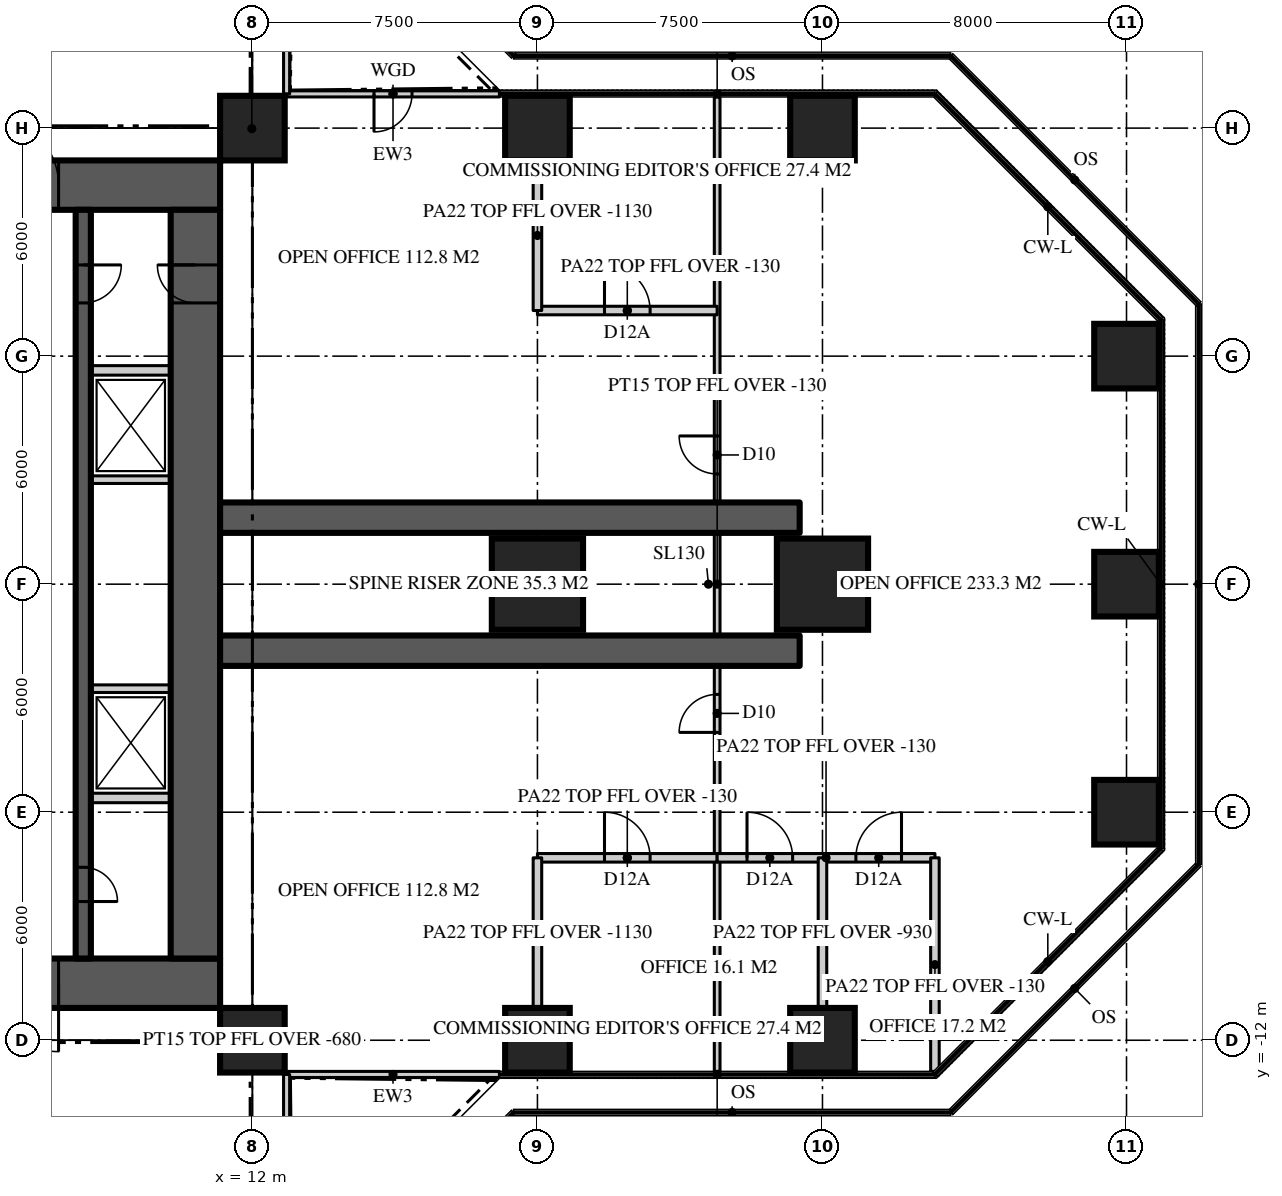
"""IFC4 building model, lengths in metres.
Left out: names, types, materials, properties, quantities, classifications, styles, units other than length and angle.
Written with IfcOpenShell. Run it as: python <this file> out.ifc"""

import sys

from ifc_helpers import new_model, si_unit, direction, frame, frame_2d, origin, origin_2d, place, context, subcontext, project, spatial, rectangle, extrude, element, fill, save


model = new_model("IFC4")
c1 = context("Model", 3, precision=1e-05, world=origin(), true_north=direction((0.0, 1.0)))
c2 = subcontext(c1, "Body", "Model", "MODEL_VIEW")
j1 = project(units=[si_unit("LENGTHUNIT", "METRE"), si_unit("PLANEANGLEUNIT", "RADIAN")], contexts=[c1])
p1 = place(None, origin())
s1 = spatial("IfcSite", under=j1, at=p1, CompositionType="ELEMENT")
p2 = place(p1, origin())
s2 = spatial("IfcBuilding", under=s1, at=p2, CompositionType="ELEMENT")
p3 = place(p2, frame((0.0, 0.0, 86.4)))
s3 = spatial("IfcBuildingStorey", under=s2, at=p3, CompositionType="ELEMENT", Elevation=86.4)
p4 = place(p3, frame((-11.15, 10.5, 0.0), z_axis=(0.0, 0.0, 1.0), x_axis=(1.0, 0.0, 0.0)))
e1 = element("IfcWall", 1, at=p4, inside=s3, PredefinedType="SHEAR", context=c2, shape_type="SweptSolid", body=[
    extrude(rectangle(XDim=22.3, YDim=1.3, at=frame_2d((11.15, 0.0))), origin(), (0.0, 0.0, 1.0), 3.9),
])
p5 = place(p4, frame((4.25, 0.0, 0.0)))
e2 = element("IfcOpeningElement", 2, at=p5, cuts=e1, PredefinedType="OPENING", context=c2, shape_type="SweptSolid", body=[
    extrude(rectangle(XDim=1.8, YDim=2.2, at=frame_2d((0.9, 1.1))), frame((0.0, 0.66, 0.0), z_axis=(0.0, -1.0, 0.0), x_axis=(1.0, 0.0, 0.0)), (0.0, 0.0, 1.0), 1.32),
])
p6 = place(p4, frame((16.25, 0.0, 0.0)))
e3 = element("IfcOpeningElement", 3, at=p6, cuts=e1, PredefinedType="OPENING", context=c2, shape_type="SweptSolid", body=[
    extrude(rectangle(XDim=1.8, YDim=2.2, at=frame_2d((0.9, 1.1))), frame((0.0, 0.66, 0.0), z_axis=(0.0, -1.0, 0.0), x_axis=(1.0, 0.0, 0.0)), (0.0, 0.0, 1.0), 1.32),
])
p7 = place(p3, frame((11.15, -10.5, 0.0), z_axis=(0.0, 0.0, 1.0), x_axis=(-1.0, 0.0, 0.0)))
e4 = element("IfcWall", 4, at=p7, inside=s3, PredefinedType="SHEAR", context=c2, shape_type="SweptSolid", body=[
    extrude(rectangle(XDim=22.3, YDim=1.3, at=frame_2d((11.15, 0.0))), origin(), (0.0, 0.0, 1.0), 3.9),
])
p8 = place(p7, frame((16.25, 0.0, 0.0)))
e5 = element("IfcOpeningElement", 5, at=p8, cuts=e4, PredefinedType="OPENING", context=c2, shape_type="SweptSolid", body=[
    extrude(rectangle(XDim=1.8, YDim=2.2, at=frame_2d((0.9, 1.1))), frame((0.0, 0.66, 0.0), z_axis=(0.0, -1.0, 0.0), x_axis=(1.0, 0.0, 0.0)), (0.0, 0.0, 1.0), 1.32),
])
p9 = place(p7, frame((4.25, 0.0, 0.0)))
e6 = element("IfcOpeningElement", 6, at=p9, cuts=e4, PredefinedType="OPENING", context=c2, shape_type="SweptSolid", body=[
    extrude(rectangle(XDim=1.8, YDim=2.2, at=frame_2d((0.9, 1.1))), frame((0.0, 0.66, 0.0), z_axis=(0.0, -1.0, 0.0), x_axis=(1.0, 0.0, 0.0)), (0.0, 0.0, 1.0), 1.32),
])
p10 = place(p3, frame((10.5, -9.85, 0.0), z_axis=(0.0, 0.0, 1.0), x_axis=(0.0, 1.0, 0.0)))
e7 = element("IfcWall", 7, at=p10, inside=s3, PredefinedType="SHEAR", context=c2, shape_type="SweptSolid", body=[
    extrude(rectangle(XDim=19.7, YDim=1.3, at=frame_2d((9.85, 0.0))), origin(), (0.0, 0.0, 1.0), 3.9),
])
p11 = place(p10, frame((17.25, 0.0, 0.0)))
e8 = element("IfcOpeningElement", 8, at=p11, cuts=e7, PredefinedType="OPENING", context=c2, shape_type="SweptSolid", body=[
    extrude(rectangle(XDim=1.0, YDim=2.2, at=frame_2d((0.5, 1.1))), frame((0.0, 0.66, 0.0), z_axis=(0.0, -1.0, 0.0), x_axis=(1.0, 0.0, 0.0)), (0.0, 0.0, 1.0), 1.32),
])
for number, where, z_axis, x_axis in (
    (9, (11.15, -1.75, 0.0), (0.0, 0.0, 1.0), (1.0, 0.0, 0.0)),
    (10, (11.15, 1.75, 0.0), (0.0, 0.0, 1.0), (1.0, 0.0, 0.0)),
):
    element("IfcWall", number, at=place(p3, frame(where, z_axis=z_axis, x_axis=x_axis)), inside=s3, PredefinedType="SHEAR", context=c2, shape_type="SweptSolid", body=[
        extrude(rectangle(XDim=15.25, YDim=0.8, at=frame_2d((7.625, 0.0))), origin(), (0.0, 0.0, 1.0), 3.9),
    ])
for number, where, z_axis, x_axis in (
    (11, (12.0, -12.0, 0.0), (0.0, 0.0, 1.0), (1.0, 0.0, 0.0)),
    (12, (19.5, -12.0, 0.0), (0.0, 0.0, 1.0), (1.0, 0.0, 0.0)),
    (13, (27.0, -12.0, 0.0), (0.0, 0.0, 1.0), (1.0, 0.0, 0.0)),
    (14, (35.0, -6.0, 0.0), (0.0, 0.0, 1.0), (1.0, 0.0, 0.0)),
):
    element("IfcColumn", number, at=place(p3, frame(where, z_axis=z_axis, x_axis=x_axis)), inside=s3, PredefinedType="COLUMN", context=c2, shape_type="SweptSolid", body=[
        extrude(rectangle(XDim=1.7, YDim=1.7, at=origin_2d()), origin(), (0.0, 0.0, 1.0), 3.9),
    ])
for number, where, z_axis, x_axis in (
    (15, (19.5, 0.0, 0.0), (0.0, 0.0, 1.0), (1.0, 0.0, 0.0)),
    (16, (27.0, 0.0, 0.0), (0.0, 0.0, 1.0), (1.0, 0.0, 0.0)),
):
    element("IfcColumn", number, at=place(p3, frame(where, z_axis=z_axis, x_axis=x_axis)), inside=s3, PredefinedType="COLUMN", context=c2, shape_type="SweptSolid", body=[
        extrude(rectangle(XDim=2.4, YDim=2.4, at=origin_2d()), origin(), (0.0, 0.0, 1.0), 3.9),
    ])
for number, where, z_axis, x_axis in (
    (17, (35.0, 0.0, 0.0), (0.0, 0.0, 1.0), (1.0, 0.0, 0.0)),
    (18, (35.0, 6.0, 0.0), (0.0, 0.0, 1.0), (1.0, 0.0, 0.0)),
    (19, (12.0, 12.0, 0.0), (0.0, 0.0, 1.0), (1.0, 0.0, 0.0)),
    (20, (19.5, 12.0, 0.0), (0.0, 0.0, 1.0), (1.0, 0.0, 0.0)),
    (21, (27.0, 12.0, 0.0), (0.0, 0.0, 1.0), (1.0, 0.0, 0.0)),
):
    element("IfcColumn", number, at=place(p3, frame(where, z_axis=z_axis, x_axis=x_axis)), inside=s3, PredefinedType="COLUMN", context=c2, shape_type="SweptSolid", body=[
        extrude(rectangle(XDim=1.7, YDim=1.7, at=origin_2d()), origin(), (0.0, 0.0, 1.0), 3.9),
    ])
p12 = place(p3, frame((12.9, -12.9, 0.0), z_axis=(0.0, 0.0, 1.0), x_axis=(1.0, 0.0, 0.0)))
e22 = element("IfcWall", 22, at=p12, inside=s3, PredefinedType="SOLIDWALL", context=c2, shape_type="SweptSolid", body=[
    extrude(rectangle(XDim=5.6, YDim=0.16, at=frame_2d((2.8, 0.0))), origin(), (0.0, 0.0, 1.0), 3.77),
])
p13 = place(p3, frame((18.5, 12.9, 0.0), z_axis=(0.0, 0.0, 1.0), x_axis=(-1.0, 0.0, 0.0)))
e23 = element("IfcWall", 23, at=p13, inside=s3, PredefinedType="SOLIDWALL", context=c2, shape_type="SweptSolid", body=[
    extrude(rectangle(XDim=5.6, YDim=0.16, at=frame_2d((2.8, 0.0))), origin(), (0.0, 0.0, 1.0), 3.77),
])
p14 = place(p13, frame((2.3, 0.0, 0.0)))
e24 = element("IfcOpeningElement", 24, at=p14, cuts=e23, PredefinedType="OPENING", context=c2, shape_type="SweptSolid", body=[
    extrude(rectangle(XDim=1.0, YDim=2.2, at=frame_2d((0.5, 1.1))), frame((0.0, 0.09, 0.0), z_axis=(0.0, -1.0, 0.0), x_axis=(1.0, 0.0, 0.0)), (0.0, 0.0, 1.0), 0.18),
])
p15 = place(p3, frame((12.9, 12.9, 0.0), z_axis=(0.0, 0.0, 1.0), x_axis=(0.0, 1.0, 0.0)))
e25 = element("IfcWall", 25, at=p15, inside=s3, PredefinedType="SOLIDWALL", context=c2, shape_type="SweptSolid", body=[
    extrude(rectangle(XDim=5.6, YDim=0.16, at=frame_2d((2.8, 0.0))), origin(), (0.0, 0.0, 1.0), 3.77),
])
p16 = place(p3, frame((12.9, -18.5, 0.0), z_axis=(0.0, 0.0, 1.0), x_axis=(0.0, 1.0, 0.0)))
e26 = element("IfcWall", 26, at=p16, inside=s3, PredefinedType="SOLIDWALL", context=c2, shape_type="SweptSolid", body=[
    extrude(rectangle(XDim=5.6, YDim=0.16, at=frame_2d((2.8, 0.0))), origin(), (0.0, 0.0, 1.0), 3.77),
])
p17 = place(p16, frame((2.3, 0.0, 0.0)))
e27 = element("IfcOpeningElement", 27, at=p17, cuts=e26, PredefinedType="OPENING", context=c2, shape_type="SweptSolid", body=[
    extrude(rectangle(XDim=1.0, YDim=2.2, at=frame_2d((0.5, 1.1))), frame((0.0, 0.09, 0.0), z_axis=(0.0, -1.0, 0.0), x_axis=(1.0, 0.0, 0.0)), (0.0, 0.0, 1.0), 0.18),
])
p18 = place(p3, frame((7.55, 9.85, 0.0), z_axis=(0.0, 0.0, 1.0), x_axis=(0.0, -1.0, 0.0)))
e28 = element("IfcWall", 28, at=p18, inside=s3, PredefinedType="SHEAR", context=c2, shape_type="SweptSolid", body=[
    extrude(rectangle(XDim=19.7, YDim=0.4, at=frame_2d((9.85, 0.0))), origin(), (0.0, 0.0, 1.0), 3.9),
])
p19 = place(p18, frame((1.45, 0.0, 0.0)))
e29 = element("IfcOpeningElement", 29, at=p19, cuts=e28, PredefinedType="OPENING", context=c2, shape_type="SweptSolid", body=[
    extrude(rectangle(XDim=1.0, YDim=2.2, at=frame_2d((0.5, 1.1))), frame((0.0, 0.21, 0.0), z_axis=(0.0, -1.0, 0.0), x_axis=(1.0, 0.0, 0.0)), (0.0, 0.0, 1.0), 0.42),
])
p20 = place(p18, frame((17.3, 0.0, 0.0)))
e30 = element("IfcOpeningElement", 30, at=p20, cuts=e28, PredefinedType="OPENING", context=c2, shape_type="SweptSolid", body=[
    extrude(rectangle(XDim=0.9, YDim=2.1, at=frame_2d((0.45, 1.05))), frame((0.0, 0.21, 0.0), z_axis=(0.0, -1.0, 0.0), x_axis=(1.0, 0.0, 0.0)), (0.0, 0.0, 1.0), 0.42),
])
for number, where, z_axis, x_axis in (
    (31, (7.75, 5.625, 0.0), (0.0, 0.0, 1.0), (1.0, 0.0, 0.0)),
    (32, (7.75, -5.625, 0.0), (0.0, 0.0, 1.0), (1.0, 0.0, 0.0)),
):
    element("IfcWall", number, at=place(p3, frame(where, z_axis=z_axis, x_axis=x_axis)), inside=s3, PredefinedType="SOLIDWALL", context=c2, shape_type="SweptSolid", body=[
        extrude(rectangle(XDim=2.1, YDim=0.25, at=frame_2d((1.05, 0.0))), origin(), (0.0, 0.0, 1.0), 3.7),
    ])
for number, where, z_axis, x_axis in (
    (33, (7.75, -2.75, 0.0), (0.0, 0.0, 1.0), (1.0, 0.0, 0.0)),
    (34, (7.75, 2.75, 0.0), (0.0, 0.0, 1.0), (1.0, 0.0, 0.0)),
):
    element("IfcWall", number, at=place(p3, frame(where, z_axis=z_axis, x_axis=x_axis)), inside=s3, PredefinedType="SOLIDWALL", context=c2, shape_type="SweptSolid", body=[
        extrude(rectangle(XDim=2.1, YDim=0.2, at=frame_2d((1.05, 0.0))), origin(), (0.0, 0.0, 1.0), 3.7),
    ])
p21 = place(p3, frame((24.229, -12.82, 0.0), z_axis=(0.0, 0.0, 1.0), x_axis=(0.0, 1.0, 0.0)))
e35 = element("IfcWall", 35, at=p21, inside=s3, PredefinedType="PARTITIONING", context=c2, shape_type="SweptSolid", body=[
    extrude(rectangle(XDim=25.64, YDim=0.15, at=frame_2d((12.82, 0.0))), origin(), (0.0, 0.0, 1.0), 3.77),
])
p22 = place(p21, frame((15.72, 0.0, 0.0)))
e36 = element("IfcOpeningElement", 36, at=p22, cuts=e35, PredefinedType="OPENING", context=c2, shape_type="SweptSolid", body=[
    extrude(rectangle(XDim=1.0, YDim=2.2, at=frame_2d((0.5, 1.1))), frame((0.0, 0.085, 0.0), z_axis=(0.0, -1.0, 0.0), x_axis=(1.0, 0.0, 0.0)), (0.0, 0.0, 1.0), 0.17),
])
p23 = place(p21, frame((8.92, 0.0, 0.0)))
e37 = element("IfcOpeningElement", 37, at=p23, cuts=e35, PredefinedType="OPENING", context=c2, shape_type="SweptSolid", body=[
    extrude(rectangle(XDim=1.0, YDim=2.2, at=frame_2d((0.5, 1.1))), frame((0.0, 0.085, 0.0), z_axis=(0.0, -1.0, 0.0), x_axis=(1.0, 0.0, 0.0)), (0.0, 0.0, 1.0), 0.17),
])
p24 = place(p3, frame((19.5, 7.2, 0.0), z_axis=(0.0, 0.0, 1.0), x_axis=(1.0, 0.0, 0.0)))
e38 = element("IfcWall", 38, at=p24, inside=s3, PredefinedType="PARTITIONING", context=c2, shape_type="SweptSolid", body=[
    extrude(rectangle(XDim=4.729, YDim=0.225, at=frame_2d((2.365, 0.0))), origin(), (0.0, 0.0, 1.0), 3.77),
])
p25 = place(p24, frame((1.764, 0.0, 0.0)))
e39 = element("IfcOpeningElement", 39, at=p25, cuts=e38, PredefinedType="OPENING", context=c2, shape_type="SweptSolid", body=[
    extrude(rectangle(XDim=1.2, YDim=2.2, at=frame_2d((0.6, 1.1))), frame((0.0, 0.123, 0.0), z_axis=(0.0, -1.0, 0.0), x_axis=(1.0, 0.0, 0.0)), (0.0, 0.0, 1.0), 0.245),
])
p26 = place(p3, frame((19.5, 7.2, 0.0), z_axis=(0.0, 0.0, 1.0), x_axis=(0.0, 1.0, 0.0)))
e40 = element("IfcWall", 40, at=p26, inside=s3, PredefinedType="PARTITIONING", context=c2, shape_type="SweptSolid", body=[
    extrude(rectangle(XDim=3.95, YDim=0.225, at=frame_2d((1.975, 0.0))), origin(), (0.0, 0.0, 1.0), 2.77),
])
p27 = place(p3, frame((19.5, -7.2, 0.0), z_axis=(0.0, 0.0, 1.0), x_axis=(1.0, 0.0, 0.0)))
e41 = element("IfcWall", 41, at=p27, inside=s3, PredefinedType="PARTITIONING", context=c2, shape_type="SweptSolid", body=[
    extrude(rectangle(XDim=4.729, YDim=0.225, at=frame_2d((2.365, 0.0))), origin(), (0.0, 0.0, 1.0), 3.77),
])
p28 = place(p27, frame((1.764, 0.0, 0.0)))
e42 = element("IfcOpeningElement", 42, at=p28, cuts=e41, PredefinedType="OPENING", context=c2, shape_type="SweptSolid", body=[
    extrude(rectangle(XDim=1.2, YDim=2.2, at=frame_2d((0.6, 1.1))), frame((0.0, 0.123, 0.0), z_axis=(0.0, -1.0, 0.0), x_axis=(1.0, 0.0, 0.0)), (0.0, 0.0, 1.0), 0.245),
])
p29 = place(p3, frame((24.229, -7.2, 0.0), z_axis=(0.0, 0.0, 1.0), x_axis=(1.0, 0.0, 0.0)))
e43 = element("IfcWall", 43, at=p29, inside=s3, PredefinedType="PARTITIONING", context=c2, shape_type="SweptSolid", body=[
    extrude(rectangle(XDim=5.73, YDim=0.225, at=frame_2d((2.865, 0.0))), origin(), (0.0, 0.0, 1.0), 3.77),
])
p30 = place(p29, frame((0.785, 0.0, 0.0)))
e44 = element("IfcOpeningElement", 44, at=p30, cuts=e43, PredefinedType="OPENING", context=c2, shape_type="SweptSolid", body=[
    extrude(rectangle(XDim=1.2, YDim=2.2, at=frame_2d((0.6, 1.1))), frame((0.0, 0.123, 0.0), z_axis=(0.0, -1.0, 0.0), x_axis=(1.0, 0.0, 0.0)), (0.0, 0.0, 1.0), 0.245),
])
p31 = place(p29, frame((3.65, 0.0, 0.0)))
e45 = element("IfcOpeningElement", 45, at=p31, cuts=e43, PredefinedType="OPENING", context=c2, shape_type="SweptSolid", body=[
    extrude(rectangle(XDim=1.2, YDim=2.2, at=frame_2d((0.6, 1.1))), frame((0.0, 0.123, 0.0), z_axis=(0.0, -1.0, 0.0), x_axis=(1.0, 0.0, 0.0)), (0.0, 0.0, 1.0), 0.245),
])
p32 = place(p3, frame((19.5, -7.2, 0.0), z_axis=(0.0, 0.0, 1.0), x_axis=(0.0, -1.0, 0.0)))
e46 = element("IfcWall", 46, at=p32, inside=s3, PredefinedType="PARTITIONING", context=c2, shape_type="SweptSolid", body=[
    extrude(rectangle(XDim=3.95, YDim=0.225, at=frame_2d((1.975, 0.0))), origin(), (0.0, 0.0, 1.0), 2.77),
])
p33 = place(p3, frame((27.0, -7.2, 0.0), z_axis=(0.0, 0.0, 1.0), x_axis=(0.0, -1.0, 0.0)))
e47 = element("IfcWall", 47, at=p33, inside=s3, PredefinedType="PARTITIONING", context=c2, shape_type="SweptSolid", body=[
    extrude(rectangle(XDim=3.95, YDim=0.225, at=frame_2d((1.975, 0.0))), origin(), (0.0, 0.0, 1.0), 2.97),
])
p34 = place(p3, frame((29.959, -7.2, 0.0), z_axis=(0.0, 0.0, 1.0), x_axis=(0.0, -1.0, 0.0)))
e48 = element("IfcWall", 48, at=p34, inside=s3, PredefinedType="PARTITIONING", context=c2, shape_type="SweptSolid", body=[
    extrude(rectangle(XDim=5.62, YDim=0.225, at=frame_2d((2.81, 0.0))), origin(), (0.0, 0.0, 1.0), 3.77),
])
for number, where, z_axis, x_axis in (
    (49, (11.15, 11.15, 0.0), (0.0, 0.0, 1.0), (0.707, 0.707, 0.0)),
    (50, (11.15, -11.15, 0.0), (0.0, 0.0, 1.0), (0.707, -0.707, 0.0)),
):
    element("IfcWall", number, at=place(p3, frame(where, z_axis=z_axis, x_axis=x_axis)), inside=s3, PredefinedType="PARTITIONING", context=c2, shape_type="SweptSolid", body=[
        extrude(rectangle(XDim=2.362, YDim=0.15, at=frame_2d((1.181, 0.0))), origin(), (0.0, 0.0, 1.0), 3.22),
    ])
p35 = place(p14, origin())
e51 = element("IfcDoor", 51, at=p35, inside=s3, OperationType="SINGLE_SWING_RIGHT", PredefinedType="DOOR", context=c2, shape_type="SweptSolid", body=[
    extrude(rectangle(XDim=1.0, YDim=2.2, at=frame_2d((0.5, 1.1))), frame((0.0, 0.025, 0.0), z_axis=(0.0, -1.0, 0.0), x_axis=(1.0, 0.0, 0.0)), (0.0, 0.0, 1.0), 0.05),
])
fill(e24, e51)
p36 = place(p6, origin())
e52 = element("IfcDoor", 52, at=p36, inside=s3, OperationType="DOUBLE_DOOR_DOUBLE_SWING", PredefinedType="DOOR", context=c2, shape_type="SweptSolid", body=[
    extrude(rectangle(XDim=1.8, YDim=2.2, at=frame_2d((0.9, 1.1))), frame((0.0, 0.025, 0.0), z_axis=(0.0, -1.0, 0.0), x_axis=(1.0, 0.0, 0.0)), (0.0, 0.0, 1.0), 0.05),
])
fill(e3, e52)
p37 = place(p9, origin())
e53 = element("IfcDoor", 53, at=p37, inside=s3, OperationType="DOUBLE_DOOR_DOUBLE_SWING", PredefinedType="DOOR", context=c2, shape_type="SweptSolid", body=[
    extrude(rectangle(XDim=1.8, YDim=2.2, at=frame_2d((0.9, 1.1))), frame((0.0, 0.025, 0.0), z_axis=(0.0, -1.0, 0.0), x_axis=(1.0, 0.0, 0.0)), (0.0, 0.0, 1.0), 0.05),
])
fill(e6, e53)
p38 = place(p19, origin())
e54 = element("IfcDoor", 54, at=p38, inside=s3, OperationType="SINGLE_SWING_LEFT", PredefinedType="DOOR", context=c2, shape_type="SweptSolid", body=[
    extrude(rectangle(XDim=1.0, YDim=2.2, at=frame_2d((0.5, 1.1))), frame((0.0, 0.025, 0.0), z_axis=(0.0, -1.0, 0.0), x_axis=(1.0, 0.0, 0.0)), (0.0, 0.0, 1.0), 0.05),
])
fill(e29, e54)
p39 = place(p11, origin())
e55 = element("IfcDoor", 55, at=p39, inside=s3, OperationType="SINGLE_SWING_RIGHT", PredefinedType="DOOR", context=c2, shape_type="SweptSolid", body=[
    extrude(rectangle(XDim=1.0, YDim=2.2, at=frame_2d((0.5, 1.1))), frame((0.0, 0.025, 0.0), z_axis=(0.0, -1.0, 0.0), x_axis=(1.0, 0.0, 0.0)), (0.0, 0.0, 1.0), 0.05),
])
fill(e8, e55)
p40 = place(p20, origin())
e56 = element("IfcDoor", 56, at=p40, inside=s3, OperationType="SINGLE_SWING_RIGHT", PredefinedType="DOOR", context=c2, shape_type="SweptSolid", body=[
    extrude(rectangle(XDim=0.9, YDim=2.1, at=frame_2d((0.45, 1.05))), frame((0.0, 0.025, 0.0), z_axis=(0.0, -1.0, 0.0), x_axis=(1.0, 0.0, 0.0)), (0.0, 0.0, 1.0), 0.05),
])
fill(e30, e56)
p41 = place(p22, origin())
e57 = element("IfcDoor", 57, at=p41, inside=s3, OperationType="SINGLE_SWING_RIGHT", PredefinedType="DOOR", context=c2, shape_type="SweptSolid", body=[
    extrude(rectangle(XDim=1.0, YDim=2.2, at=frame_2d((0.5, 1.1))), frame((0.0, 0.025, 0.0), z_axis=(0.0, -1.0, 0.0), x_axis=(1.0, 0.0, 0.0)), (0.0, 0.0, 1.0), 0.05),
])
fill(e36, e57)
p42 = place(p23, origin())
e58 = element("IfcDoor", 58, at=p42, inside=s3, OperationType="SINGLE_SWING_LEFT", PredefinedType="DOOR", context=c2, shape_type="SweptSolid", body=[
    extrude(rectangle(XDim=1.0, YDim=2.2, at=frame_2d((0.5, 1.1))), frame((0.0, 0.025, 0.0), z_axis=(0.0, -1.0, 0.0), x_axis=(1.0, 0.0, 0.0)), (0.0, 0.0, 1.0), 0.05),
])
fill(e37, e58)
p43 = place(p25, origin())
e59 = element("IfcDoor", 59, at=p43, inside=s3, OperationType="SINGLE_SWING_LEFT", PredefinedType="DOOR", context=c2, shape_type="SweptSolid", body=[
    extrude(rectangle(XDim=1.2, YDim=2.2, at=frame_2d((0.6, 1.1))), frame((0.0, 0.025, 0.0), z_axis=(0.0, -1.0, 0.0), x_axis=(1.0, 0.0, 0.0)), (0.0, 0.0, 1.0), 0.05),
])
fill(e39, e59)
p44 = place(p28, origin())
e60 = element("IfcDoor", 60, at=p44, inside=s3, OperationType="SINGLE_SWING_LEFT", PredefinedType="DOOR", context=c2, shape_type="SweptSolid", body=[
    extrude(rectangle(XDim=1.2, YDim=2.2, at=frame_2d((0.6, 1.1))), frame((0.0, 0.025, 0.0), z_axis=(0.0, -1.0, 0.0), x_axis=(1.0, 0.0, 0.0)), (0.0, 0.0, 1.0), 0.05),
])
fill(e42, e60)
p45 = place(p30, origin())
e61 = element("IfcDoor", 61, at=p45, inside=s3, OperationType="SINGLE_SWING_LEFT", PredefinedType="DOOR", context=c2, shape_type="SweptSolid", body=[
    extrude(rectangle(XDim=1.2, YDim=2.2, at=frame_2d((0.6, 1.1))), frame((0.0, 0.025, 0.0), z_axis=(0.0, -1.0, 0.0), x_axis=(1.0, 0.0, 0.0)), (0.0, 0.0, 1.0), 0.05),
])
fill(e44, e61)
p46 = place(p31, origin())
e62 = element("IfcDoor", 62, at=p46, inside=s3, OperationType="SINGLE_SWING_RIGHT", PredefinedType="DOOR", context=c2, shape_type="SweptSolid", body=[
    extrude(rectangle(XDim=1.2, YDim=2.2, at=frame_2d((0.6, 1.1))), frame((0.0, 0.025, 0.0), z_axis=(0.0, -1.0, 0.0), x_axis=(1.0, 0.0, 0.0)), (0.0, 0.0, 1.0), 0.05),
])
fill(e45, e62)
save(model, sys.argv[1])
